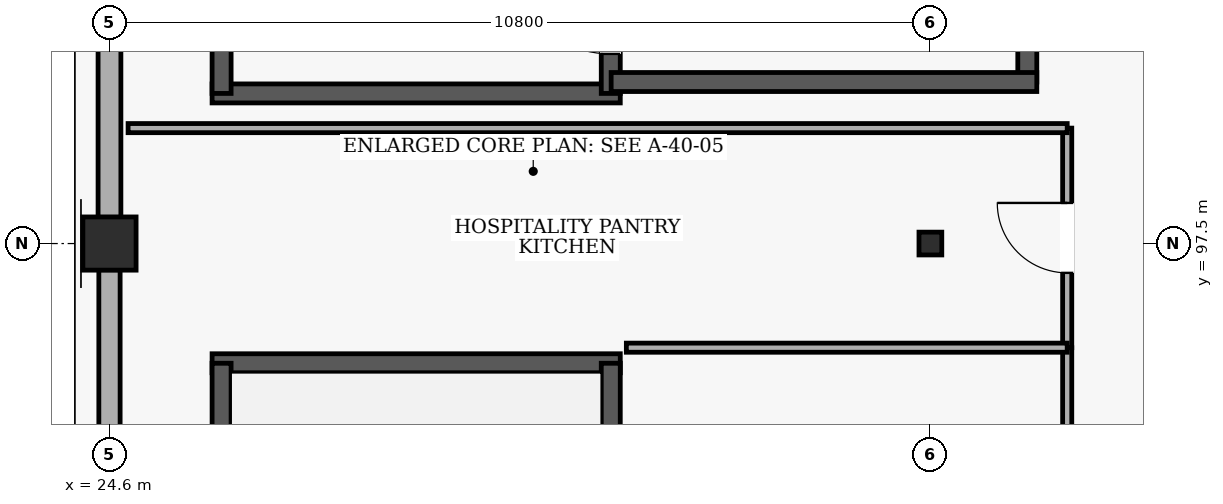
"""IFC4 building model, lengths in metres.
Left out: names, types, materials, properties, quantities, classifications, styles, units other than length and angle.
Written with IfcOpenShell. Run it as: python <this file> out.ifc"""

import sys

from ifc_helpers import new_model, si_unit, direction, frame, frame_2d, origin, origin_2d, place, context, subcontext, project, spatial, rectangle, hollow_rectangle, extrude, element, fill, save


model = new_model("IFC4")
c1 = context("Model", 3, precision=1e-05, world=origin(), true_north=direction((0.0, 1.0)))
c2 = subcontext(c1, "Body", "Model", "MODEL_VIEW")
j1 = project(units=[si_unit("LENGTHUNIT", "METRE"), si_unit("PLANEANGLEUNIT", "RADIAN")], contexts=[c1])
p1 = place(None, origin())
s1 = spatial("IfcSite", under=j1, at=p1, CompositionType="ELEMENT")
p2 = place(p1, origin())
s2 = spatial("IfcBuilding", under=s1, at=p2, CompositionType="ELEMENT")
p3 = place(p2, frame((0.0, 0.0, 24.6)))
s3 = spatial("IfcBuildingStorey", under=s2, at=p3, CompositionType="ELEMENT", Elevation=24.6)
p4 = place(p3, frame((24.6, 97.5, 0.0), z_axis=(0.0, 0.0, 1.0), x_axis=(1.0, 0.0, 0.0)))
e1 = element("IfcColumn", 1, at=p4, inside=s3, PredefinedType="COLUMN", context=c2, shape_type="SweptSolid", body=[
    extrude(rectangle(XDim=0.7, YDim=0.7, at=origin_2d()), origin(), (0.0, 0.0, 1.0), 4.8),
])
p5 = place(p3, frame((35.4, 97.5, 0.0), z_axis=(0.0, 0.0, 1.0), x_axis=(1.0, 0.0, 0.0)))
e2 = element("IfcColumn", 2, at=p5, inside=s3, PredefinedType="COLUMN", context=c2, shape_type="SweptSolid", body=[
    extrude(hollow_rectangle(XDim=0.3, YDim=0.3, WallThickness=0.016, at=origin_2d()), origin(), (0.0, 0.0, 1.0), 4.8),
])
p6 = place(p3, frame((24.6, 83.445, 0.0), z_axis=(0.0, 0.0, 1.0), x_axis=(0.0, 1.0, 0.0)))
e3 = element("IfcWall", 3, at=p6, inside=s3, PredefinedType="SOLIDWALL", context=c2, shape_type="SweptSolid", body=[
    extrude(rectangle(XDim=13.71, YDim=0.28, at=frame_2d((6.855, 0.0))), origin(), (0.0, 0.0, 1.0), 3.58),
])
p7 = place(p6, frame((5.955, 0.0, 0.9)))
e4 = element("IfcOpeningElement", 4, at=p7, cuts=e3, PredefinedType="OPENING", context=c2, shape_type="SweptSolid", body=[
    extrude(rectangle(XDim=1.8, YDim=1.8, at=frame_2d((0.9, 0.9))), frame((0.0, 0.15, 0.0), z_axis=(0.0, -1.0, 0.0), x_axis=(1.0, 0.0, 0.0)), (0.0, 0.0, 1.0), 0.3),
])
p8 = place(p3, frame((24.6, 97.845, 0.0), z_axis=(0.0, 0.0, 1.0), x_axis=(0.0, 1.0, 0.0)))
e5 = element("IfcWall", 5, at=p8, inside=s3, PredefinedType="SOLIDWALL", context=c2, shape_type="SweptSolid", body=[
    extrude(rectangle(XDim=6.51, YDim=0.3, at=frame_2d((3.255, 0.0))), origin(), (0.0, 0.0, 1.0), 3.88),
])
p9 = place(p8, frame((2.205, 0.0, 0.9)))
e6 = element("IfcOpeningElement", 6, at=p9, cuts=e5, PredefinedType="OPENING", context=c2, shape_type="SweptSolid", body=[
    extrude(rectangle(XDim=2.1, YDim=1.8, at=frame_2d((1.05, 0.9))), frame((0.0, 0.16, 0.0), z_axis=(0.0, -1.0, 0.0), x_axis=(1.0, 0.0, 0.0)), (0.0, 0.0, 1.0), 0.32),
])
p10 = place(p3, frame((31.32, 95.925, 0.0), z_axis=(0.0, 0.0, 1.0), x_axis=(-1.0, 0.0, 0.0)))
e7 = element("IfcWall", 7, at=p10, inside=s3, PredefinedType="SHEAR", context=c2, shape_type="SweptSolid", body=[
    extrude(rectangle(XDim=5.37, YDim=0.25, at=frame_2d((2.685, 0.0))), origin(), (0.0, 0.0, 1.0), 4.5),
])
p11 = place(p3, frame((26.075, 85.075, 0.0), z_axis=(0.0, 0.0, 1.0), x_axis=(0.0, 1.0, 0.0)))
e8 = element("IfcWall", 8, at=p11, inside=s3, PredefinedType="SHEAR", context=c2, shape_type="SweptSolid", body=[
    extrude(rectangle(XDim=10.85, YDim=0.25, at=frame_2d((5.425, 0.0))), origin(), (0.0, 0.0, 1.0), 4.5),
])
p12 = place(p3, frame((31.195, 85.075, 0.0), z_axis=(0.0, 0.0, 1.0), x_axis=(0.0, 1.0, 0.0)))
e9 = element("IfcWall", 9, at=p12, inside=s3, PredefinedType="SHEAR", context=c2, shape_type="SweptSolid", body=[
    extrude(rectangle(XDim=10.85, YDim=0.25, at=frame_2d((5.425, 0.0))), origin(), (0.0, 0.0, 1.0), 4.5),
])
p13 = place(p12, frame((0.52, 0.0, 0.0)))
e10 = element("IfcOpeningElement", 10, at=p13, cuts=e9, PredefinedType="OPENING", context=c2, shape_type="SweptSolid", body=[
    extrude(rectangle(XDim=1.4, YDim=2.15, at=frame_2d((0.7, 1.075))), frame((0.0, 0.135, 0.0), z_axis=(0.0, -1.0, 0.0), x_axis=(1.0, 0.0, 0.0)), (0.0, 0.0, 1.0), 0.27),
])
p14 = place(p3, frame((25.95, 99.475, 0.0), z_axis=(0.0, 0.0, 1.0), x_axis=(1.0, 0.0, 0.0)))
e11 = element("IfcWall", 11, at=p14, inside=s3, PredefinedType="SHEAR", context=c2, shape_type="SweptSolid", body=[
    extrude(rectangle(XDim=5.37, YDim=0.25, at=frame_2d((2.685, 0.0))), origin(), (0.0, 0.0, 1.0), 4.5),
])
p15 = place(p3, frame((26.075, 99.475, 0.0), z_axis=(0.0, 0.0, 1.0), x_axis=(0.0, 1.0, 0.0)))
e12 = element("IfcWall", 12, at=p15, inside=s3, PredefinedType="SHEAR", context=c2, shape_type="SweptSolid", body=[
    extrude(rectangle(XDim=10.85, YDim=0.25, at=frame_2d((5.425, 0.0))), origin(), (0.0, 0.0, 1.0), 4.5),
])
p16 = place(p3, frame((31.195, 99.475, 0.0), z_axis=(0.0, 0.0, 1.0), x_axis=(0.0, 1.0, 0.0)))
e13 = element("IfcWall", 13, at=p16, inside=s3, PredefinedType="SHEAR", context=c2, shape_type="SweptSolid", body=[
    extrude(rectangle(XDim=10.85, YDim=0.25, at=frame_2d((5.425, 0.0))), origin(), (0.0, 0.0, 1.0), 4.5),
])
p17 = place(p16, frame((0.52, 0.0, 0.0)))
e14 = element("IfcOpeningElement", 14, at=p17, cuts=e13, PredefinedType="OPENING", context=c2, shape_type="SweptSolid", body=[
    extrude(rectangle(XDim=1.4, YDim=2.15, at=frame_2d((0.7, 1.075))), frame((0.0, 0.135, 0.0), z_axis=(0.0, -1.0, 0.0), x_axis=(1.0, 0.0, 0.0)), (0.0, 0.0, 1.0), 0.27),
])
p18 = place(p3, frame((36.675, 99.625, 0.0), z_axis=(0.0, 0.0, 1.0), x_axis=(0.0, 1.0, 0.0)))
e15 = element("IfcWall", 15, at=p18, inside=s3, PredefinedType="SHEAR", context=c2, shape_type="SweptSolid", body=[
    extrude(rectangle(XDim=3.45, YDim=0.25, at=frame_2d((1.725, 0.0))), origin(), (0.0, 0.0, 1.0), 4.5),
])
p19 = place(p18, frame((1.025, 0.0, 0.0)))
e16 = element("IfcOpeningElement", 16, at=p19, cuts=e15, PredefinedType="OPENING", context=c2, shape_type="SweptSolid", body=[
    extrude(rectangle(XDim=1.4, YDim=2.15, at=frame_2d((0.7, 1.075))), frame((0.0, 0.135, 0.0), z_axis=(0.0, -1.0, 0.0), x_axis=(1.0, 0.0, 0.0)), (0.0, 0.0, 1.0), 0.27),
])
p20 = place(p3, frame((31.2, 99.625, 0.0), z_axis=(0.0, 0.0, 1.0), x_axis=(1.0, 0.0, 0.0)))
e17 = element("IfcWall", 17, at=p20, inside=s3, PredefinedType="SHEAR", context=c2, shape_type="SweptSolid", body=[
    extrude(rectangle(XDim=5.6, YDim=0.25, at=frame_2d((2.8, 0.0))), origin(), (0.0, 0.0, 1.0), 4.5),
])
p21 = place(p3, frame((37.2, 96.13, 0.0), z_axis=(0.0, 0.0, 1.0), x_axis=(0.0, 1.0, 0.0)))
e18 = element("IfcWall", 18, at=p21, inside=s3, PredefinedType="PARTITIONING", context=c2, shape_type="SweptSolid", body=[
    extrude(rectangle(XDim=2.889, YDim=0.12, at=frame_2d((1.444, 0.0))), origin(), (0.0, 0.0, 1.0), 4.5),
])
p22 = place(p21, frame((0.984, 0.0, 0.0)))
e19 = element("IfcOpeningElement", 19, at=p22, cuts=e18, PredefinedType="OPENING", context=c2, shape_type="SweptSolid", body=[
    extrude(rectangle(XDim=0.92, YDim=2.1, at=frame_2d((0.46, 1.05))), frame((0.0, 0.07, 0.0), z_axis=(0.0, -1.0, 0.0), x_axis=(1.0, 0.0, 0.0)), (0.0, 0.0, 1.0), 0.14),
])
p23 = place(p3, frame((37.2, 99.019, 0.0), z_axis=(0.0, 0.0, 1.0), x_axis=(-1.0, 0.0, 0.0)))
e20 = element("IfcWall", 20, at=p23, inside=s3, PredefinedType="PARTITIONING", context=c2, shape_type="SweptSolid", body=[
    extrude(rectangle(XDim=12.355, YDim=0.12, at=frame_2d((6.177, 0.0))), origin(), (0.0, 0.0, 1.0), 4.5),
])
p24 = place(p3, frame((37.2, 91.68, 0.0), z_axis=(0.0, 0.0, 1.0), x_axis=(0.0, 1.0, 0.0)))
e21 = element("IfcWall", 21, at=p24, inside=s3, PredefinedType="PARTITIONING", context=c2, shape_type="SweptSolid", body=[
    extrude(rectangle(XDim=4.45, YDim=0.12, at=frame_2d((2.225, 0.0))), origin(), (0.0, 0.0, 1.0), 4.5),
])
p25 = place(p24, frame((1.725, 0.0, 0.0)))
e22 = element("IfcOpeningElement", 22, at=p25, cuts=e21, PredefinedType="OPENING", context=c2, shape_type="SweptSolid", body=[
    extrude(rectangle(XDim=1.0, YDim=2.1, at=frame_2d((0.5, 1.05))), frame((0.0, 0.07, 0.0), z_axis=(0.0, -1.0, 0.0), x_axis=(1.0, 0.0, 0.0)), (0.0, 0.0, 1.0), 0.14),
])
p26 = place(p3, frame((37.2, 96.13, 0.0), z_axis=(0.0, 0.0, 1.0), x_axis=(-1.0, 0.0, 0.0)))
e23 = element("IfcWall", 23, at=p26, inside=s3, PredefinedType="PARTITIONING", context=c2, shape_type="SweptSolid", body=[
    extrude(rectangle(XDim=5.8, YDim=0.12, at=frame_2d((2.9, 0.0))), origin(), (0.0, 0.0, 1.0), 4.5),
])
p27 = place(p17, origin())
e24 = element("IfcDoor", 24, at=p27, inside=s3, OperationType="SINGLE_SWING_RIGHT", PredefinedType="DOOR", context=c2, shape_type="SweptSolid", body=[
    extrude(rectangle(XDim=1.4, YDim=2.15, at=frame_2d((0.7, 1.075))), frame((0.0, 0.025, 0.0), z_axis=(0.0, -1.0, 0.0), x_axis=(1.0, 0.0, 0.0)), (0.0, 0.0, 1.0), 0.05),
])
fill(e14, e24)
p28 = place(p22, origin())
e25 = element("IfcDoor", 25, at=p28, inside=s3, OperationType="SINGLE_SWING_RIGHT", PredefinedType="DOOR", context=c2, shape_type="SweptSolid", body=[
    extrude(rectangle(XDim=0.92, YDim=2.1, at=frame_2d((0.46, 1.05))), frame((0.0, 0.025, 0.0), z_axis=(0.0, -1.0, 0.0), x_axis=(1.0, 0.0, 0.0)), (0.0, 0.0, 1.0), 0.05),
])
fill(e19, e25)
save(model, sys.argv[1])
